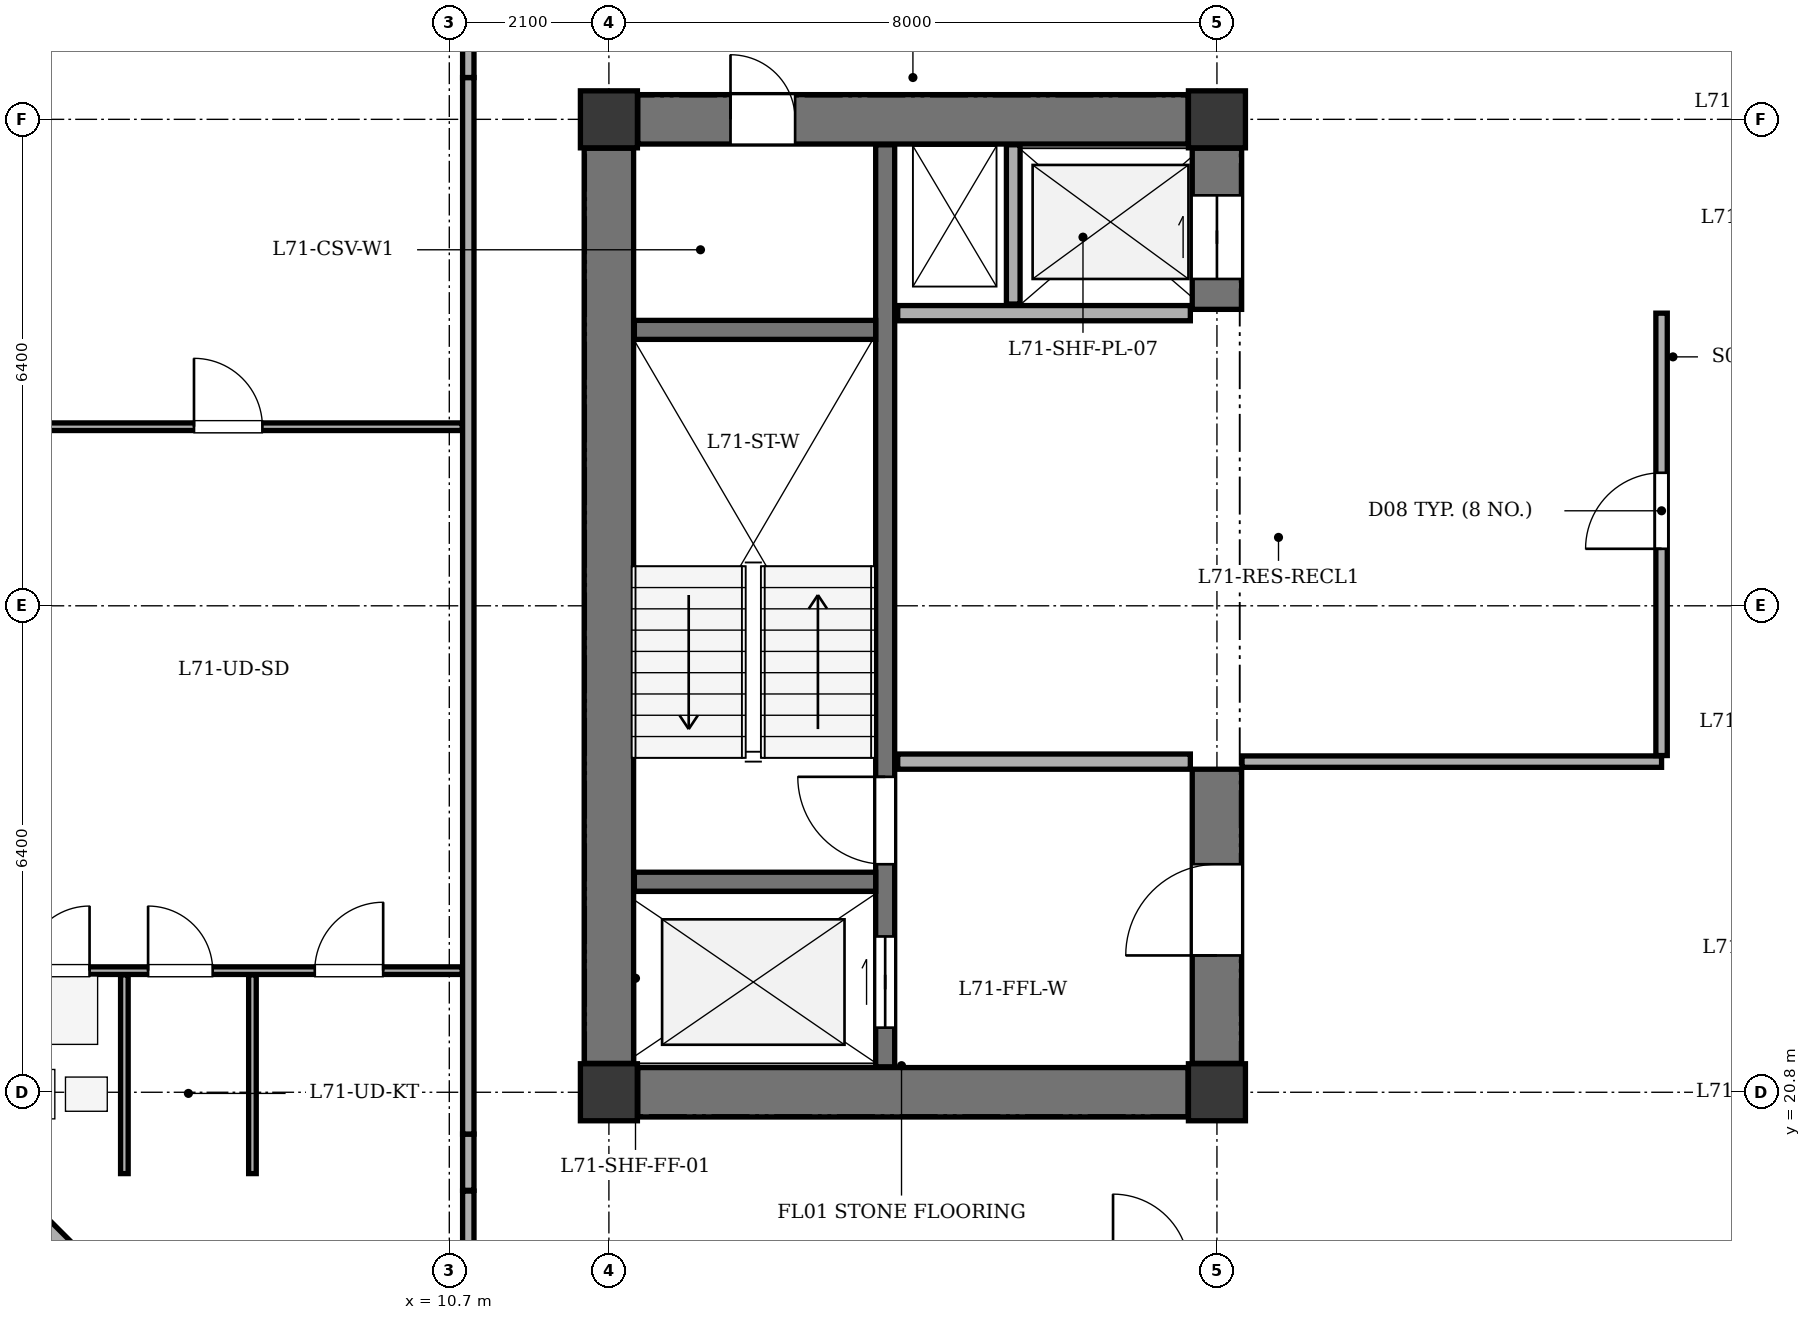
"""IFC4 building model, lengths in metres.
Left out: names, types, materials, properties, quantities, classifications, styles, units other than length and angle.
Written with IfcOpenShell. Run it as: python <this file> out.ifc"""

import sys

from ifc_helpers import new_model, si_unit, direction, frame, frame_2d, origin, origin_2d, place, context, subcontext, project, spatial, rectangle, extrude, element, fill, save


model = new_model("IFC4")
c1 = context("Model", 3, precision=1e-05, world=origin(), true_north=direction((0.0, 1.0)))
c2 = subcontext(c1, "Body", "Model", "MODEL_VIEW")
j1 = project(units=[si_unit("LENGTHUNIT", "METRE"), si_unit("PLANEANGLEUNIT", "RADIAN")], contexts=[c1])
p1 = place(None, origin())
s1 = spatial("IfcSite", under=j1, at=p1, CompositionType="ELEMENT")
p2 = place(p1, origin())
s2 = spatial("IfcBuilding", under=s1, at=p2, CompositionType="ELEMENT")
p3 = place(p2, frame((0.0, 0.0, 268.7)))
s3 = spatial("IfcBuildingStorey", under=s2, at=p3, CompositionType="ELEMENT", Elevation=268.7)
for number, where, z_axis, x_axis in (
    (1, (12.8, 20.8, 0.0), (0.0, 0.0, 1.0), (1.0, 0.0, 0.0)),
    (2, (20.8, 20.8, 0.0), (0.0, 0.0, 1.0), (1.0, 0.0, 0.0)),
    (3, (12.8, 33.6, 0.0), (0.0, 0.0, 1.0), (1.0, 0.0, 0.0)),
    (4, (20.8, 33.6, 0.0), (0.0, 0.0, 1.0), (1.0, 0.0, 0.0)),
):
    element("IfcColumn", number, at=place(p3, frame(where, z_axis=z_axis, x_axis=x_axis)), inside=s3, PredefinedType="COLUMN", context=c2, shape_type="SweptSolid", body=[
        extrude(rectangle(XDim=0.75, YDim=0.75, at=origin_2d()), origin(), (0.0, 0.0, 1.0), 3.4),
    ])
p4 = place(p3, frame((8.3, 16.03, 0.0), z_axis=(0.0, 0.0, 1.0), x_axis=(-0.707106781187, 0.707106781187, 0.0)))
e5 = element("IfcWall", 5, at=p4, inside=s3, PredefinedType="STANDARD", context=c2, shape_type="SweptSolid", body=[
    extrude(rectangle(XDim=5.402, YDim=0.32, at=frame_2d((2.701, 0.0))), origin(), (0.0, 0.0, 1.0), 2.725),
])
p5 = place(p4, frame((2.001, 0.0, 0.75)))
e6 = element("IfcOpeningElement", 6, at=p5, cuts=e5, PredefinedType="OPENING", context=c2, shape_type="SweptSolid", body=[
    extrude(rectangle(XDim=1.4, YDim=1.65, at=frame_2d((0.7, 0.825))), frame((0.0, 0.17, 0.0), z_axis=(0.0, -1.0, 0.0), x_axis=(1.0, 0.0, 0.0)), (0.0, 0.0, 1.0), 0.34),
])
p6 = place(p3, frame((12.8, 21.18, 0.0), z_axis=(0.0, 0.0, 1.0), x_axis=(0.0, 1.0, 0.0)))
e7 = element("IfcWall", 7, at=p6, inside=s3, PredefinedType="SHEAR", context=c2, shape_type="SweptSolid", body=[
    extrude(rectangle(XDim=12.04, YDim=0.65, at=frame_2d((6.02, 0.0))), origin(), (0.0, 0.0, 1.0), 3.1),
])
p7 = place(p3, frame((13.18, 20.8, 0.0), z_axis=(0.0, 0.0, 1.0), x_axis=(1.0, 0.0, 0.0)))
e8 = element("IfcWall", 8, at=p7, inside=s3, PredefinedType="SHEAR", context=c2, shape_type="SweptSolid", body=[
    extrude(rectangle(XDim=7.24, YDim=0.65, at=frame_2d((3.62, 0.0))), origin(), (0.0, 0.0, 1.0), 3.1),
])
p8 = place(p3, frame((13.18, 33.6, 0.0), z_axis=(0.0, 0.0, 1.0), x_axis=(1.0, 0.0, 0.0)))
e9 = element("IfcWall", 9, at=p8, inside=s3, PredefinedType="SHEAR", context=c2, shape_type="SweptSolid", body=[
    extrude(rectangle(XDim=7.24, YDim=0.65, at=frame_2d((3.62, 0.0))), origin(), (0.0, 0.0, 1.0), 3.1),
])
p9 = place(p8, frame((1.22, 0.0, 0.0)))
e10 = element("IfcOpeningElement", 10, at=p9, cuts=e9, PredefinedType="OPENING", context=c2, shape_type="SweptSolid", body=[
    extrude(rectangle(XDim=0.85, YDim=2.02, at=frame_2d((0.425, 1.01))), frame((0.0, 0.335, 0.0), z_axis=(0.0, -1.0, 0.0), x_axis=(1.0, 0.0, 0.0)), (0.0, 0.0, 1.0), 0.67),
])
p10 = place(p3, frame((20.8, 21.18, 0.0), z_axis=(0.0, 0.0, 1.0), x_axis=(0.0, 1.0, 0.0)))
e11 = element("IfcWall", 11, at=p10, inside=s3, PredefinedType="SHEAR", context=c2, shape_type="SweptSolid", body=[
    extrude(rectangle(XDim=3.87, YDim=0.65, at=frame_2d((1.935, 0.0))), origin(), (0.0, 0.0, 1.0), 3.1),
])
p11 = place(p10, frame((1.42, 0.0, 0.0)))
e12 = element("IfcOpeningElement", 12, at=p11, cuts=e11, PredefinedType="OPENING", context=c2, shape_type="SweptSolid", body=[
    extrude(rectangle(XDim=1.2, YDim=2.15, at=frame_2d((0.6, 1.075))), frame((0.0, 0.335, 0.0), z_axis=(0.0, -1.0, 0.0), x_axis=(1.0, 0.0, 0.0)), (0.0, 0.0, 1.0), 0.67),
])
p12 = place(p3, frame((20.8, 31.1, 0.0), z_axis=(0.0, 0.0, 1.0), x_axis=(0.0, 1.0, 0.0)))
e13 = element("IfcWall", 13, at=p12, inside=s3, PredefinedType="SHEAR", context=c2, shape_type="SweptSolid", body=[
    extrude(rectangle(XDim=2.12, YDim=0.65, at=frame_2d((1.06, 0.0))), origin(), (0.0, 0.0, 1.0), 3.1),
])
p13 = place(p12, frame((0.4, 0.0, 0.0)))
e14 = element("IfcOpeningElement", 14, at=p13, cuts=e13, PredefinedType="OPENING", context=c2, shape_type="SweptSolid", body=[
    extrude(rectangle(XDim=1.1, YDim=2.1, at=frame_2d((0.55, 1.05))), frame((0.0, 0.335, 0.0), z_axis=(0.0, -1.0, 0.0), x_axis=(1.0, 0.0, 0.0)), (0.0, 0.0, 1.0), 0.67),
])
p14 = place(p3, frame((16.435, 21.135, 0.0), z_axis=(0.0, 0.0, 1.0), x_axis=(0.0, 1.0, 0.0)))
e15 = element("IfcWall", 15, at=p14, inside=s3, PredefinedType="SHEAR", context=c2, shape_type="SweptSolid", body=[
    extrude(rectangle(XDim=12.13, YDim=0.25, at=frame_2d((6.065, 0.0))), origin(), (0.0, 0.0, 1.0), 3.1),
])
p15 = place(p14, frame((0.515, 0.0, 0.0)))
e16 = element("IfcOpeningElement", 16, at=p15, cuts=e15, PredefinedType="OPENING", context=c2, shape_type="SweptSolid", body=[
    extrude(rectangle(XDim=1.2, YDim=2.15, at=frame_2d((0.6, 1.075))), frame((0.0, 0.135, 0.0), z_axis=(0.0, -1.0, 0.0), x_axis=(1.0, 0.0, 0.0)), (0.0, 0.0, 1.0), 0.27),
])
p16 = place(p14, frame((2.665, 0.0, 0.0)))
e17 = element("IfcOpeningElement", 17, at=p16, cuts=e15, PredefinedType="OPENING", context=c2, shape_type="SweptSolid", body=[
    extrude(rectangle(XDim=1.15, YDim=2.15, at=frame_2d((0.575, 1.075))), frame((0.0, 0.135, 0.0), z_axis=(0.0, -1.0, 0.0), x_axis=(1.0, 0.0, 0.0)), (0.0, 0.0, 1.0), 0.27),
])
for number, where, z_axis, x_axis in (
    (18, (13.135, 23.57, 0.0), (0.0, 0.0, 1.0), (1.0, 0.0, 0.0)),
    (19, (13.135, 30.83, 0.0), (0.0, 0.0, 1.0), (1.0, 0.0, 0.0)),
):
    element("IfcWall", number, at=place(p3, frame(where, z_axis=z_axis, x_axis=x_axis)), inside=s3, PredefinedType="SHEAR", context=c2, shape_type="SweptSolid", body=[
        extrude(rectangle(XDim=3.175, YDim=0.25, at=frame_2d((1.587, 0.0))), origin(), (0.0, 0.0, 1.0), 3.1),
    ])
for number, where, z_axis, x_axis in (
    (20, (16.6, 25.15, 0.0), (0.0, 0.0, 1.0), (1.0, 0.0, 0.0)),
    (21, (16.6, 31.05, 0.0), (0.0, 0.0, 1.0), (1.0, 0.0, 0.0)),
):
    element("IfcWall", number, at=place(p3, frame(where, z_axis=z_axis, x_axis=x_axis)), inside=s3, PredefinedType="SOLIDWALL", context=c2, shape_type="SweptSolid", body=[
        extrude(rectangle(XDim=3.85, YDim=0.2, at=frame_2d((1.925, 0.0))), origin(), (0.0, 0.0, 1.0), 3.1),
    ])
p17 = place(p3, frame((18.12, 31.17, 0.0), z_axis=(0.0, 0.0, 1.0), x_axis=(0.0, 1.0, 0.0)))
e22 = element("IfcWall", 22, at=p17, inside=s3, PredefinedType="PARTITIONING", context=c2, shape_type="SweptSolid", body=[
    extrude(rectangle(XDim=2.095, YDim=0.18, at=frame_2d((1.047, 0.0))), origin(), (0.0, 0.0, 1.0), 3.1),
])
p18 = place(p3, frame((21.13, 25.15, 0.0), z_axis=(0.0, 0.0, 1.0), x_axis=(1.0, 0.0, 0.0)))
e23 = element("IfcWall", 23, at=p18, inside=s3, PredefinedType="PARTITIONING", context=c2, shape_type="SweptSolid", body=[
    extrude(rectangle(XDim=5.52, YDim=0.15, at=frame_2d((2.76, 0.0))), origin(), (0.0, 0.0, 1.0), 3.1),
])
p19 = place(p3, frame((26.65, 25.23, 0.0), z_axis=(0.0, 0.0, 1.0), x_axis=(0.0, 1.0, 0.0)))
e24 = element("IfcWall", 24, at=p19, inside=s3, PredefinedType="PARTITIONING", context=c2, shape_type="SweptSolid", body=[
    extrude(rectangle(XDim=5.82, YDim=0.15, at=frame_2d((2.91, 0.0))), origin(), (0.0, 0.0, 1.0), 3.1),
])
p20 = place(p19, frame((2.72, 0.0, 0.0)))
e25 = element("IfcOpeningElement", 25, at=p20, cuts=e24, PredefinedType="OPENING", context=c2, shape_type="SweptSolid", body=[
    extrude(rectangle(XDim=1.0, YDim=2.1, at=frame_2d((0.5, 1.05))), frame((0.0, 0.085, 0.0), z_axis=(0.0, -1.0, 0.0), x_axis=(1.0, 0.0, 0.0)), (0.0, 0.0, 1.0), 0.17),
])
p21 = place(p3, frame((10.95, 19.5, 0.0), z_axis=(0.0, 0.0, 1.0), x_axis=(0.0, -1.0, 0.0)))
e26 = element("IfcWall", 26, at=p21, inside=s3, PredefinedType="PARTITIONING", context=c2, shape_type="SweptSolid", body=[
    extrude(rectangle(XDim=0.96, YDim=0.15, at=frame_2d((0.48, 0.0))), origin(), (0.0, 0.0, 1.0), 3.1),
])
p22 = place(p3, frame((10.95, 19.51, 0.0), z_axis=(0.0, 0.0, 1.0), x_axis=(0.0, 1.0, 0.0)))
e27 = element("IfcWall", 27, at=p22, inside=s3, PredefinedType="PARTITIONING", context=c2, shape_type="SweptSolid", body=[
    extrude(rectangle(XDim=0.74, YDim=0.15, at=frame_2d((0.37, 0.0))), origin(), (0.0, 0.0, 1.0), 3.1),
])
p23 = place(p3, frame((10.95, 20.25, 0.0), z_axis=(0.0, 0.0, 1.0), x_axis=(0.0, 1.0, 0.0)))
e28 = element("IfcWall", 28, at=p23, inside=s3, PredefinedType="PARTITIONING", context=c2, shape_type="SweptSolid", body=[
    extrude(rectangle(XDim=13.9, YDim=0.15, at=frame_2d((6.95, 0.0))), origin(), (0.0, 0.0, 1.0), 3.1),
])
p24 = place(p3, frame((10.95, 34.15, 0.0), z_axis=(0.0, 0.0, 1.0), x_axis=(0.0, 1.0, 0.0)))
e29 = element("IfcWall", 29, at=p24, inside=s3, PredefinedType="PARTITIONING", context=c2, shape_type="SweptSolid", body=[
    extrude(rectangle(XDim=1.79, YDim=0.15, at=frame_2d((0.895, 0.0))), origin(), (0.0, 0.0, 1.0), 3.1),
])
p25 = place(p24, frame((0.58, 0.0, 0.0)))
e30 = element("IfcOpeningElement", 30, at=p25, cuts=e29, PredefinedType="OPENING", context=c2, shape_type="SweptSolid", body=[
    extrude(rectangle(XDim=1.0, YDim=2.1, at=frame_2d((0.5, 1.05))), frame((0.0, 0.085, 0.0), z_axis=(0.0, -1.0, 0.0), x_axis=(1.0, 0.0, 0.0)), (0.0, 0.0, 1.0), 0.17),
])
p26 = place(p3, frame((4.645, 22.4, 0.0), z_axis=(0.0, 0.0, 1.0), x_axis=(1.0, 0.0, 0.0)))
e31 = element("IfcWall", 31, at=p26, inside=s3, PredefinedType="PARTITIONING", context=c2, shape_type="SweptSolid", body=[
    extrude(rectangle(XDim=6.225, YDim=0.1, at=frame_2d((3.113, 0.0))), origin(), (0.0, 0.0, 1.0), 3.1),
])
p27 = place(p26, frame((0.472, 0.0, 0.0)))
e32 = element("IfcOpeningElement", 32, at=p27, cuts=e31, PredefinedType="OPENING", context=c2, shape_type="SweptSolid", body=[
    extrude(rectangle(XDim=0.85, YDim=2.05, at=frame_2d((0.425, 1.025))), frame((0.0, 0.06, 0.0), z_axis=(0.0, -1.0, 0.0), x_axis=(1.0, 0.0, 0.0)), (0.0, 0.0, 1.0), 0.12),
])
p28 = place(p26, frame((2.092, 0.0, 0.0)))
e33 = element("IfcOpeningElement", 33, at=p28, cuts=e31, PredefinedType="OPENING", context=c2, shape_type="SweptSolid", body=[
    extrude(rectangle(XDim=0.85, YDim=2.05, at=frame_2d((0.425, 1.025))), frame((0.0, 0.06, 0.0), z_axis=(0.0, -1.0, 0.0), x_axis=(1.0, 0.0, 0.0)), (0.0, 0.0, 1.0), 0.12),
])
p29 = place(p26, frame((4.285, 0.0, 0.0)))
e34 = element("IfcOpeningElement", 34, at=p29, cuts=e31, PredefinedType="OPENING", context=c2, shape_type="SweptSolid", body=[
    extrude(rectangle(XDim=0.9, YDim=2.05, at=frame_2d((0.45, 1.025))), frame((0.0, 0.06, 0.0), z_axis=(0.0, -1.0, 0.0), x_axis=(1.0, 0.0, 0.0)), (0.0, 0.0, 1.0), 0.12),
])
p30 = place(p3, frame((4.645, 29.556, 0.0), z_axis=(0.0, 0.0, 1.0), x_axis=(1.0, 0.0, 0.0)))
e35 = element("IfcWall", 35, at=p30, inside=s3, PredefinedType="PARTITIONING", context=c2, shape_type="SweptSolid", body=[
    extrude(rectangle(XDim=6.225, YDim=0.1, at=frame_2d((3.113, 0.0))), origin(), (0.0, 0.0, 1.0), 2.725),
])
p31 = place(p30, frame((2.696, 0.0, 0.0)))
e36 = element("IfcOpeningElement", 36, at=p31, cuts=e35, PredefinedType="OPENING", context=c2, shape_type="SweptSolid", body=[
    extrude(rectangle(XDim=0.9, YDim=2.05, at=frame_2d((0.45, 1.025))), frame((0.0, 0.06, 0.0), z_axis=(0.0, -1.0, 0.0), x_axis=(1.0, 0.0, 0.0)), (0.0, 0.0, 1.0), 0.12),
])
for number, where, z_axis, x_axis in (
    (37, (6.425, 19.73, 0.0), (0.0, 0.0, 1.0), (0.0, 1.0, 0.0)),
    (38, (8.11, 19.73, 0.0), (0.0, 0.0, 1.0), (0.0, 1.0, 0.0)),
):
    element("IfcWall", number, at=place(p3, frame(where, z_axis=z_axis, x_axis=x_axis)), inside=s3, PredefinedType="PARTITIONING", context=c2, shape_type="SweptSolid", body=[
        extrude(rectangle(XDim=2.615, YDim=0.1, at=frame_2d((1.308, 0.0))), origin(), (0.0, 0.0, 1.0), 3.1),
    ])
p32 = place(p9, origin())
e39 = element("IfcDoor", 39, at=p32, inside=s3, OperationType="SINGLE_SWING_LEFT", PredefinedType="DOOR", context=c2, shape_type="SweptSolid", body=[
    extrude(rectangle(XDim=0.85, YDim=2.02, at=frame_2d((0.425, 1.01))), frame((0.0, 0.025, 0.0), z_axis=(0.0, -1.0, 0.0), x_axis=(1.0, 0.0, 0.0)), (0.0, 0.0, 1.0), 0.05),
])
fill(e10, e39)
p33 = place(p11, origin())
e40 = element("IfcDoor", 40, at=p33, inside=s3, OperationType="SINGLE_SWING_LEFT", PredefinedType="DOOR", context=c2, shape_type="SweptSolid", body=[
    extrude(rectangle(XDim=1.2, YDim=2.15, at=frame_2d((0.6, 1.075))), frame((0.0, 0.025, 0.0), z_axis=(0.0, -1.0, 0.0), x_axis=(1.0, 0.0, 0.0)), (0.0, 0.0, 1.0), 0.05),
])
fill(e12, e40)
p34 = place(p13, origin())
e41 = element("IfcDoor", 41, at=p34, inside=s3, OperationType="DOUBLE_DOOR_SLIDING", PredefinedType="DOOR", context=c2, shape_type="SweptSolid", body=[
    extrude(rectangle(XDim=1.1, YDim=2.1, at=frame_2d((0.55, 1.05))), frame((0.0, 0.025, 0.0), z_axis=(0.0, -1.0, 0.0), x_axis=(1.0, 0.0, 0.0)), (0.0, 0.0, 1.0), 0.05),
])
fill(e14, e41)
p35 = place(p15, origin())
e42 = element("IfcDoor", 42, at=p35, inside=s3, OperationType="DOUBLE_DOOR_SLIDING", PredefinedType="DOOR", context=c2, shape_type="SweptSolid", body=[
    extrude(rectangle(XDim=1.2, YDim=2.15, at=frame_2d((0.6, 1.075))), frame((0.0, 0.025, 0.0), z_axis=(0.0, -1.0, 0.0), x_axis=(1.0, 0.0, 0.0)), (0.0, 0.0, 1.0), 0.05),
])
fill(e16, e42)
p36 = place(p16, origin())
e43 = element("IfcDoor", 43, at=p36, inside=s3, OperationType="SINGLE_SWING_RIGHT", PredefinedType="DOOR", context=c2, shape_type="SweptSolid", body=[
    extrude(rectangle(XDim=1.15, YDim=2.15, at=frame_2d((0.575, 1.075))), frame((0.0, 0.025, 0.0), z_axis=(0.0, -1.0, 0.0), x_axis=(1.0, 0.0, 0.0)), (0.0, 0.0, 1.0), 0.05),
])
fill(e17, e43)
p37 = place(p20, origin())
e44 = element("IfcDoor", 44, at=p37, inside=s3, OperationType="SINGLE_SWING_LEFT", PredefinedType="DOOR", context=c2, shape_type="SweptSolid", body=[
    extrude(rectangle(XDim=1.0, YDim=2.1, at=frame_2d((0.5, 1.05))), frame((0.0, 0.025, 0.0), z_axis=(0.0, -1.0, 0.0), x_axis=(1.0, 0.0, 0.0)), (0.0, 0.0, 1.0), 0.05),
])
fill(e25, e44)
p38 = place(p31, origin())
e45 = element("IfcDoor", 45, at=p38, inside=s3, OperationType="SINGLE_SWING_LEFT", PredefinedType="DOOR", context=c2, shape_type="SweptSolid", body=[
    extrude(rectangle(XDim=0.9, YDim=2.05, at=frame_2d((0.45, 1.025))), frame((0.0, 0.025, 0.0), z_axis=(0.0, -1.0, 0.0), x_axis=(1.0, 0.0, 0.0)), (0.0, 0.0, 1.0), 0.05),
])
fill(e36, e45)
p39 = place(p27, origin())
e46 = element("IfcDoor", 46, at=p39, inside=s3, OperationType="SINGLE_SWING_RIGHT", PredefinedType="DOOR", context=c2, shape_type="SweptSolid", body=[
    extrude(rectangle(XDim=0.85, YDim=2.05, at=frame_2d((0.425, 1.025))), frame((0.0, 0.025, 0.0), z_axis=(0.0, -1.0, 0.0), x_axis=(1.0, 0.0, 0.0)), (0.0, 0.0, 1.0), 0.05),
])
fill(e32, e46)
p40 = place(p28, origin())
e47 = element("IfcDoor", 47, at=p40, inside=s3, OperationType="SINGLE_SWING_LEFT", PredefinedType="DOOR", context=c2, shape_type="SweptSolid", body=[
    extrude(rectangle(XDim=0.85, YDim=2.05, at=frame_2d((0.425, 1.025))), frame((0.0, 0.025, 0.0), z_axis=(0.0, -1.0, 0.0), x_axis=(1.0, 0.0, 0.0)), (0.0, 0.0, 1.0), 0.05),
])
fill(e33, e47)
p41 = place(p29, origin())
e48 = element("IfcDoor", 48, at=p41, inside=s3, OperationType="SINGLE_SWING_RIGHT", PredefinedType="DOOR", context=c2, shape_type="SweptSolid", body=[
    extrude(rectangle(XDim=0.9, YDim=2.05, at=frame_2d((0.45, 1.025))), frame((0.0, 0.025, 0.0), z_axis=(0.0, -1.0, 0.0), x_axis=(1.0, 0.0, 0.0)), (0.0, 0.0, 1.0), 0.05),
])
fill(e34, e48)
save(model, sys.argv[1])
